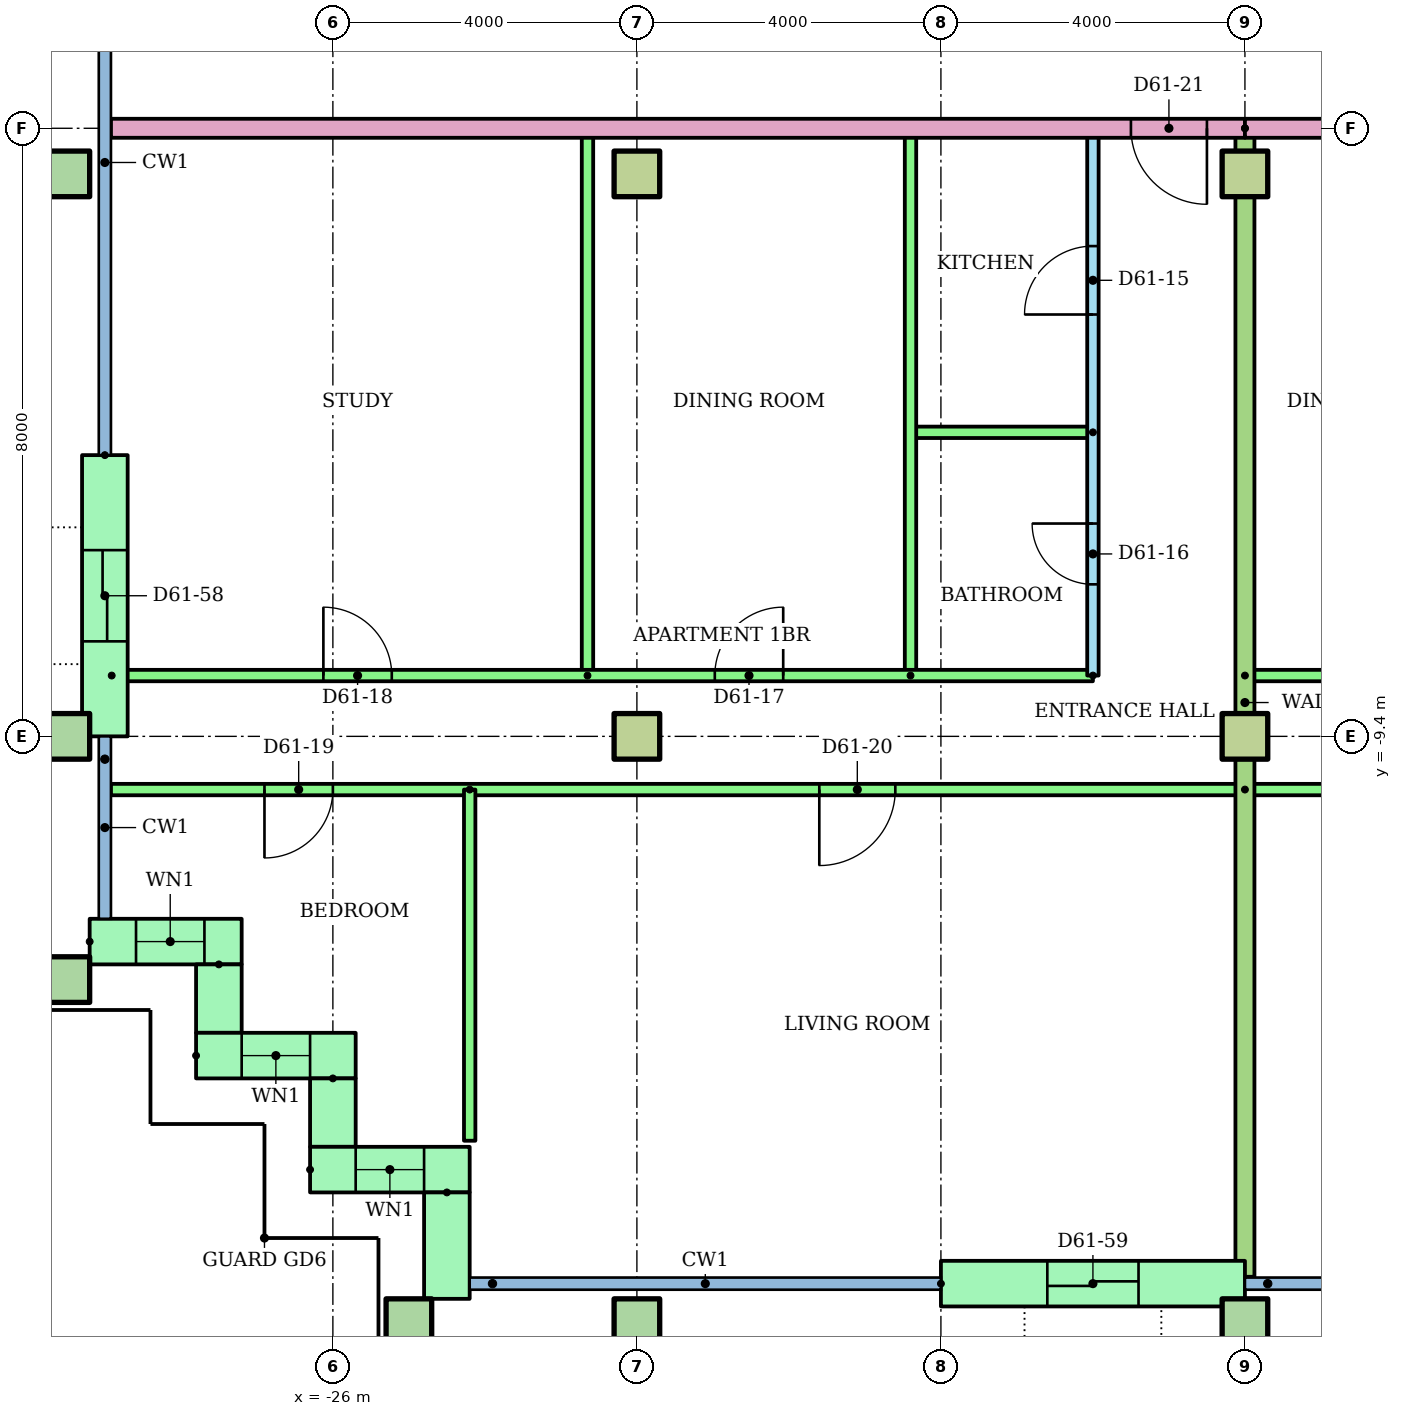
"""IFC4 building model, lengths in metres.
Left out: names, types, materials, properties, quantities, classifications, styles, units other than length and angle.
Written with IfcOpenShell. Run it as: python <this file> out.ifc"""

import sys

from ifc_helpers import new_model, si_unit, direction, frame, frame_2d, origin, origin_2d, place, context, subcontext, project, spatial, rectangle, hollow_rectangle, extrude, element, fill, save


model = new_model("IFC4")
c1 = context("Model", 3, precision=1e-05, world=origin(), true_north=direction((0.0, 1.0)))
c2 = subcontext(c1, "Body", "Model", "MODEL_VIEW")
j1 = project(units=[si_unit("LENGTHUNIT", "METRE"), si_unit("PLANEANGLEUNIT", "RADIAN")], contexts=[c1])
p1 = place(None, origin())
s1 = spatial("IfcSite", under=j1, at=p1, CompositionType="ELEMENT")
p2 = place(p1, origin())
s2 = spatial("IfcBuilding", under=s1, at=p2, CompositionType="ELEMENT")
p3 = place(p2, frame((0.0, 0.0, 233.2)))
s3 = spatial("IfcBuildingStorey", under=s2, at=p3, CompositionType="ELEMENT", Elevation=233.2)
for number, where in (
    (1, (-25.0, -17.1, 0.0)),
    (2, (-22.0, -17.1, 0.0)),
    (3, (-14.0, -17.1, 0.0)),
    (4, (-29.5, -12.6, 0.0)),
    (5, (-29.5, -9.4, 0.0)),
):
    element("IfcColumn", number, at=place(p3, frame(where)), inside=s3, PredefinedType="COLUMN", context=c2, shape_type="SweptSolid", body=[
        extrude(hollow_rectangle(XDim=0.6, YDim=0.6, WallThickness=0.03, at=origin_2d()), origin(), (0.0, 0.0, 1.0), 3.2),
    ])
for number, where in (
    (6, (-22.0, -9.4, 0.0)),
    (7, (-14.0, -9.4, 0.0)),
):
    element("IfcColumn", number, at=place(p3, frame(where)), inside=s3, PredefinedType="COLUMN", context=c2, shape_type="SweptSolid", body=[
        extrude(rectangle(XDim=0.6, YDim=0.6, at=origin_2d()), origin(), (0.0, 0.0, 1.0), 3.2),
    ])
p4 = place(p3, frame((-29.5, -2.0, 0.0)))
e8 = element("IfcColumn", 8, at=p4, inside=s3, PredefinedType="COLUMN", context=c2, shape_type="SweptSolid", body=[
    extrude(hollow_rectangle(XDim=0.6, YDim=0.6, WallThickness=0.03, at=origin_2d()), origin(), (0.0, 0.0, 1.0), 3.2),
])
for number, where in (
    (9, (-22.0, -2.0, 0.0)),
    (10, (-14.0, -2.0, 0.0)),
):
    element("IfcColumn", number, at=place(p3, frame(where)), inside=s3, PredefinedType="COLUMN", context=c2, shape_type="SweptSolid", body=[
        extrude(rectangle(XDim=0.6, YDim=0.6, at=origin_2d()), origin(), (0.0, 0.0, 1.0), 3.2),
    ])
p5 = place(p3, frame((-29.0, -5.7, 0.0), z_axis=(0.0, 0.0, 1.0), x_axis=(0.0, -1.0, 0.0)))
e11 = element("IfcWall", 11, at=p5, inside=s3, PredefinedType="STANDARD", context=c2, shape_type="SweptSolid", body=[
    extrude(rectangle(XDim=3.7, YDim=0.6, at=frame_2d((1.85, 0.0))), origin(), (0.0, 0.0, 1.0), 2.92),
])
p6 = place(p5, frame((1.25, 0.0, 0.0)))
e12 = element("IfcOpeningElement", 12, at=p6, cuts=e11, PredefinedType="OPENING", context=c2, shape_type="SweptSolid", body=[
    extrude(rectangle(XDim=1.2, YDim=2.1, at=frame_2d((0.6, 1.05))), frame((0.0, 0.31, 0.0), z_axis=(0.0, -1.0, 0.0), x_axis=(1.0, 0.0, 0.0)), (0.0, 0.0, 1.0), 0.62),
])
p7 = place(p3, frame((-29.2, -12.1, 0.0)))
e13 = element("IfcWall", 13, at=p7, inside=s3, PredefinedType="STANDARD", context=c2, shape_type="SweptSolid", body=[
    extrude(rectangle(XDim=2.0, YDim=0.6, at=frame_2d((1.0, 0.0))), origin(), (0.0, 0.0, 1.0), 2.92),
])
p8 = place(p7, frame((0.61, 0.0, 0.9)))
e14 = element("IfcOpeningElement", 14, at=p8, cuts=e13, PredefinedType="OPENING", context=c2, shape_type="SweptSolid", body=[
    extrude(rectangle(XDim=0.9, YDim=1.5, at=frame_2d((0.45, 0.75))), frame((0.0, 0.31, 0.0), z_axis=(0.0, -1.0, 0.0), x_axis=(1.0, 0.0, 0.0)), (0.0, 0.0, 1.0), 0.62),
])
p9 = place(p3, frame((-27.5, -12.4, 0.0), z_axis=(0.0, 0.0, 1.0), x_axis=(0.0, -1.0, 0.0)))
e15 = element("IfcWall", 15, at=p9, inside=s3, PredefinedType="STANDARD", context=c2, shape_type="SweptSolid", body=[
    extrude(rectangle(XDim=0.9, YDim=0.6, at=frame_2d((0.45, 0.0))), origin(), (0.0, 0.0, 1.0), 2.92),
])
p10 = place(p3, frame((-27.8, -13.6, 0.0)))
e16 = element("IfcWall", 16, at=p10, inside=s3, PredefinedType="STANDARD", context=c2, shape_type="SweptSolid", body=[
    extrude(rectangle(XDim=2.1, YDim=0.6, at=frame_2d((1.05, 0.0))), origin(), (0.0, 0.0, 1.0), 2.92),
])
p11 = place(p10, frame((0.6, 0.0, 0.9)))
e17 = element("IfcOpeningElement", 17, at=p11, cuts=e16, PredefinedType="OPENING", context=c2, shape_type="SweptSolid", body=[
    extrude(rectangle(XDim=0.9, YDim=1.5, at=frame_2d((0.45, 0.75))), frame((0.0, 0.31, 0.0), z_axis=(0.0, -1.0, 0.0), x_axis=(1.0, 0.0, 0.0)), (0.0, 0.0, 1.0), 0.62),
])
p12 = place(p3, frame((-26.0, -13.9, 0.0), z_axis=(0.0, 0.0, 1.0), x_axis=(0.0, -1.0, 0.0)))
e18 = element("IfcWall", 18, at=p12, inside=s3, PredefinedType="STANDARD", context=c2, shape_type="SweptSolid", body=[
    extrude(rectangle(XDim=0.9, YDim=0.6, at=frame_2d((0.45, 0.0))), origin(), (0.0, 0.0, 1.0), 2.92),
])
p13 = place(p3, frame((-26.3, -15.1, 0.0)))
e19 = element("IfcWall", 19, at=p13, inside=s3, PredefinedType="STANDARD", context=c2, shape_type="SweptSolid", body=[
    extrude(rectangle(XDim=2.1, YDim=0.6, at=frame_2d((1.05, 0.0))), origin(), (0.0, 0.0, 1.0), 2.92),
])
p14 = place(p13, frame((0.6, 0.0, 0.9)))
e20 = element("IfcOpeningElement", 20, at=p14, cuts=e19, PredefinedType="OPENING", context=c2, shape_type="SweptSolid", body=[
    extrude(rectangle(XDim=0.9, YDim=1.5, at=frame_2d((0.45, 0.75))), frame((0.0, 0.31, 0.0), z_axis=(0.0, -1.0, 0.0), x_axis=(1.0, 0.0, 0.0)), (0.0, 0.0, 1.0), 0.62),
])
p15 = place(p3, frame((-24.5, -15.4, 0.0), z_axis=(0.0, 0.0, 1.0), x_axis=(0.0, -1.0, 0.0)))
e21 = element("IfcWall", 21, at=p15, inside=s3, PredefinedType="STANDARD", context=c2, shape_type="SweptSolid", body=[
    extrude(rectangle(XDim=1.4, YDim=0.6, at=frame_2d((0.7, 0.0))), origin(), (0.0, 0.0, 1.0), 2.92),
])
p16 = place(p3, frame((-18.0, -16.6, 0.0)))
e22 = element("IfcWall", 22, at=p16, inside=s3, PredefinedType="STANDARD", context=c2, shape_type="SweptSolid", body=[
    extrude(rectangle(XDim=4.0, YDim=0.6, at=frame_2d((2.0, 0.0))), origin(), (0.0, 0.0, 1.0), 2.92),
])
p17 = place(p16, frame((1.4, 0.0, 0.0)))
e23 = element("IfcOpeningElement", 23, at=p17, cuts=e22, PredefinedType="OPENING", context=c2, shape_type="SweptSolid", body=[
    extrude(rectangle(XDim=1.2, YDim=2.1, at=frame_2d((0.6, 1.05))), frame((0.0, 0.31, 0.0), z_axis=(0.0, -1.0, 0.0), x_axis=(1.0, 0.0, 0.0)), (0.0, 0.0, 1.0), 0.62),
])
p18 = place(p3, frame((-16.0, -8.6, 0.0), z_axis=(0.0, 0.0, 1.0), x_axis=(0.0, 1.0, 0.0)))
e24 = element("IfcWall", 24, at=p18, inside=s3, PredefinedType="PARTITIONING", context=c2, shape_type="SweptSolid", body=[
    extrude(rectangle(XDim=7.2, YDim=0.15, at=frame_2d((3.6, 0.0))), origin(), (0.0, 0.0, 1.0), 2.4),
])
p19 = place(p18, frame((4.75, 0.0, 0.0)))
e25 = element("IfcOpeningElement", 25, at=p19, cuts=e24, PredefinedType="OPENING", context=c2, shape_type="SweptSolid", body=[
    extrude(rectangle(XDim=0.9, YDim=2.1, at=frame_2d((0.45, 1.05))), frame((0.0, 0.085, 0.0), z_axis=(0.0, -1.0, 0.0), x_axis=(1.0, 0.0, 0.0)), (0.0, 0.0, 1.0), 0.17),
])
p20 = place(p18, frame((1.2, 0.0, 0.0)))
e26 = element("IfcOpeningElement", 26, at=p20, cuts=e24, PredefinedType="OPENING", context=c2, shape_type="SweptSolid", body=[
    extrude(rectangle(XDim=0.8, YDim=2.1, at=frame_2d((0.4, 1.05))), frame((0.0, 0.085, 0.0), z_axis=(0.0, -1.0, 0.0), x_axis=(1.0, 0.0, 0.0)), (0.0, 0.0, 1.0), 0.17),
])
p21 = place(p3, frame((-16.0, -5.4, 0.0), z_axis=(0.0, 0.0, 1.0), x_axis=(-1.0, 0.0, 0.0)))
e27 = element("IfcWall", 27, at=p21, inside=s3, PredefinedType="PARTITIONING", context=c2, shape_type="SweptSolid", body=[
    extrude(rectangle(XDim=2.4, YDim=0.15, at=frame_2d((1.2, 0.0))), origin(), (0.0, 0.0, 1.0), 2.4),
])
for number, where, z_axis, x_axis in (
    (28, (-18.4, -8.6, 0.0), (0.0, 0.0, 1.0), (0.0, 1.0, 0.0)),
    (29, (-22.65, -8.6, 0.0), (0.0, 0.0, 1.0), (0.0, 1.0, 0.0)),
):
    element("IfcWall", number, at=place(p3, frame(where, z_axis=z_axis, x_axis=x_axis)), inside=s3, PredefinedType="PARTITIONING", context=c2, shape_type="SweptSolid", body=[
        extrude(rectangle(XDim=7.2, YDim=0.15, at=frame_2d((3.6, 0.0))), origin(), (0.0, 0.0, 1.0), 2.4),
    ])
p22 = place(p3, frame((-28.91, -8.6, 0.0)))
e30 = element("IfcWall", 30, at=p22, inside=s3, PredefinedType="PARTITIONING", context=c2, shape_type="SweptSolid", body=[
    extrude(rectangle(XDim=12.91, YDim=0.15, at=frame_2d((6.455, 0.0))), origin(), (0.0, 0.0, 1.0), 2.4),
])
p23 = place(p22, frame((7.935, 0.0, 0.0)))
e31 = element("IfcOpeningElement", 31, at=p23, cuts=e30, PredefinedType="OPENING", context=c2, shape_type="SweptSolid", body=[
    extrude(rectangle(XDim=0.9, YDim=2.1, at=frame_2d((0.45, 1.05))), frame((0.0, 0.085, 0.0), z_axis=(0.0, -1.0, 0.0), x_axis=(1.0, 0.0, 0.0)), (0.0, 0.0, 1.0), 0.17),
])
p24 = place(p22, frame((2.785, 0.0, 0.0)))
e32 = element("IfcOpeningElement", 32, at=p24, cuts=e30, PredefinedType="OPENING", context=c2, shape_type="SweptSolid", body=[
    extrude(rectangle(XDim=0.9, YDim=2.1, at=frame_2d((0.45, 1.05))), frame((0.0, 0.085, 0.0), z_axis=(0.0, -1.0, 0.0), x_axis=(1.0, 0.0, 0.0)), (0.0, 0.0, 1.0), 0.17),
])
p25 = place(p3, frame((-14.0, -10.1, 0.0), z_axis=(0.0, 0.0, 1.0), x_axis=(-1.0, 0.0, 0.0)))
e33 = element("IfcWall", 33, at=p25, inside=s3, PredefinedType="PARTITIONING", context=c2, shape_type="SweptSolid", body=[
    extrude(rectangle(XDim=14.92, YDim=0.15, at=frame_2d((7.46, 0.0))), origin(), (0.0, 0.0, 1.0), 2.4),
])
p26 = place(p25, frame((12.0, 0.0, 0.0)))
e34 = element("IfcOpeningElement", 34, at=p26, cuts=e33, PredefinedType="OPENING", context=c2, shape_type="SweptSolid", body=[
    extrude(rectangle(XDim=0.9, YDim=2.1, at=frame_2d((0.45, 1.05))), frame((0.0, 0.085, 0.0), z_axis=(0.0, -1.0, 0.0), x_axis=(1.0, 0.0, 0.0)), (0.0, 0.0, 1.0), 0.17),
])
p27 = place(p25, frame((4.6, 0.0, 0.0)))
e35 = element("IfcOpeningElement", 35, at=p27, cuts=e33, PredefinedType="OPENING", context=c2, shape_type="SweptSolid", body=[
    extrude(rectangle(XDim=1.0, YDim=2.1, at=frame_2d((0.5, 1.05))), frame((0.0, 0.085, 0.0), z_axis=(0.0, -1.0, 0.0), x_axis=(1.0, 0.0, 0.0)), (0.0, 0.0, 1.0), 0.17),
])
p28 = place(p3, frame((-24.2, -10.1, 0.0), z_axis=(0.0, 0.0, 1.0), x_axis=(0.0, -1.0, 0.0)))
e36 = element("IfcWall", 36, at=p28, inside=s3, PredefinedType="PARTITIONING", context=c2, shape_type="SweptSolid", body=[
    extrude(rectangle(XDim=4.62, YDim=0.15, at=frame_2d((2.31, 0.0))), origin(), (0.0, 0.0, 1.0), 2.4),
])
p29 = place(p3, frame((-14.0, -8.6, 0.0)))
e37 = element("IfcWall", 37, at=p29, inside=s3, PredefinedType="PARTITIONING", context=c2, shape_type="SweptSolid", body=[
    extrude(rectangle(XDim=14.0, YDim=0.15, at=frame_2d((7.0, 0.0))), origin(), (0.0, 0.0, 1.0), 2.4),
])
p30 = place(p29, frame((8.775, 0.0, 0.0)))
e38 = element("IfcOpeningElement", 38, at=p30, cuts=e37, PredefinedType="OPENING", context=c2, shape_type="SweptSolid", body=[
    extrude(rectangle(XDim=0.9, YDim=2.1, at=frame_2d((0.45, 1.05))), frame((0.0, 0.085, 0.0), z_axis=(0.0, -1.0, 0.0), x_axis=(1.0, 0.0, 0.0)), (0.0, 0.0, 1.0), 0.17),
])
p31 = place(p29, frame((4.525, 0.0, 0.0)))
e39 = element("IfcOpeningElement", 39, at=p31, cuts=e37, PredefinedType="OPENING", context=c2, shape_type="SweptSolid", body=[
    extrude(rectangle(XDim=0.9, YDim=2.1, at=frame_2d((0.45, 1.05))), frame((0.0, 0.085, 0.0), z_axis=(0.0, -1.0, 0.0), x_axis=(1.0, 0.0, 0.0)), (0.0, 0.0, 1.0), 0.17),
])
p32 = place(p29, frame((1.1, 0.0, 0.0)))
e40 = element("IfcOpeningElement", 40, at=p32, cuts=e37, PredefinedType="OPENING", context=c2, shape_type="SweptSolid", body=[
    extrude(rectangle(XDim=0.9, YDim=2.1, at=frame_2d((0.45, 1.05))), frame((0.0, 0.085, 0.0), z_axis=(0.0, -1.0, 0.0), x_axis=(1.0, 0.0, 0.0)), (0.0, 0.0, 1.0), 0.17),
])
p33 = place(p3, frame((2.0, -10.1, 0.0), z_axis=(0.0, 0.0, 1.0), x_axis=(-1.0, 0.0, 0.0)))
e41 = element("IfcWall", 41, at=p33, inside=s3, PredefinedType="PARTITIONING", context=c2, shape_type="SweptSolid", body=[
    extrude(rectangle(XDim=16.0, YDim=0.15, at=frame_2d((8.0, 0.0))), origin(), (0.0, 0.0, 1.0), 2.4),
])
p34 = place(p33, frame((13.55, 0.0, 0.0)))
e42 = element("IfcOpeningElement", 42, at=p34, cuts=e41, PredefinedType="OPENING", context=c2, shape_type="SweptSolid", body=[
    extrude(rectangle(XDim=0.9, YDim=2.1, at=frame_2d((0.45, 1.05))), frame((0.0, 0.085, 0.0), z_axis=(0.0, -1.0, 0.0), x_axis=(1.0, 0.0, 0.0)), (0.0, 0.0, 1.0), 0.17),
])
p35 = place(p33, frame((9.5, 0.0, 0.0)))
e43 = element("IfcOpeningElement", 43, at=p35, cuts=e41, PredefinedType="OPENING", context=c2, shape_type="SweptSolid", body=[
    extrude(rectangle(XDim=1.0, YDim=2.1, at=frame_2d((0.5, 1.05))), frame((0.0, 0.085, 0.0), z_axis=(0.0, -1.0, 0.0), x_axis=(1.0, 0.0, 0.0)), (0.0, 0.0, 1.0), 0.17),
])
p36 = place(p33, frame((5.55, 0.0, 0.0)))
e44 = element("IfcOpeningElement", 44, at=p36, cuts=e41, PredefinedType="OPENING", context=c2, shape_type="SweptSolid", body=[
    extrude(rectangle(XDim=0.9, YDim=2.1, at=frame_2d((0.45, 1.05))), frame((0.0, 0.085, 0.0), z_axis=(0.0, -1.0, 0.0), x_axis=(1.0, 0.0, 0.0)), (0.0, 0.0, 1.0), 0.17),
])
p37 = place(p33, frame((1.55, 0.0, 0.0)))
e45 = element("IfcOpeningElement", 45, at=p37, cuts=e41, PredefinedType="OPENING", context=c2, shape_type="SweptSolid", body=[
    extrude(rectangle(XDim=0.9, YDim=2.1, at=frame_2d((0.45, 1.05))), frame((0.0, 0.085, 0.0), z_axis=(0.0, -1.0, 0.0), x_axis=(1.0, 0.0, 0.0)), (0.0, 0.0, 1.0), 0.17),
])
p38 = place(p3, frame((-14.0, -1.4, 0.0), z_axis=(0.0, 0.0, 1.0), x_axis=(0.0, -1.0, 0.0)))
e46 = element("IfcWall", 46, at=p38, inside=s3, PredefinedType="PARTITIONING", context=c2, shape_type="SweptSolid", body=[
    extrude(rectangle(XDim=15.11, YDim=0.25, at=frame_2d((7.555, 0.0))), origin(), (0.0, 0.0, 1.0), 2.4),
])
p39 = place(p3, frame((-14.0, -1.4, 0.0), z_axis=(0.0, 0.0, 1.0), x_axis=(-1.0, 0.0, 0.0)))
e47 = element("IfcWall", 47, at=p39, inside=s3, PredefinedType="PARTITIONING", context=c2, shape_type="SweptSolid", body=[
    extrude(rectangle(XDim=14.92, YDim=0.25, at=frame_2d((7.46, 0.0))), origin(), (0.0, 0.0, 1.0), 2.4),
])
p40 = place(p39, frame((0.5, 0.0, 0.0)))
e48 = element("IfcOpeningElement", 48, at=p40, cuts=e47, PredefinedType="OPENING", context=c2, shape_type="SweptSolid", body=[
    extrude(rectangle(XDim=1.0, YDim=2.1, at=frame_2d((0.5, 1.05))), frame((0.0, 0.135, 0.0), z_axis=(0.0, -1.0, 0.0), x_axis=(1.0, 0.0, 0.0)), (0.0, 0.0, 1.0), 0.27),
])
p41 = place(p3, frame((14.0, -1.4, 0.0), z_axis=(0.0, 0.0, 1.0), x_axis=(-1.0, 0.0, 0.0)))
e49 = element("IfcWall", 49, at=p41, inside=s3, PredefinedType="PARTITIONING", context=c2, shape_type="SweptSolid", body=[
    extrude(rectangle(XDim=28.0, YDim=0.25, at=frame_2d((14.0, 0.0))), origin(), (0.0, 0.0, 1.0), 2.4),
])
p42 = place(p41, frame((12.5, 0.0, 0.0)))
e50 = element("IfcOpeningElement", 50, at=p42, cuts=e49, PredefinedType="OPENING", context=c2, shape_type="SweptSolid", body=[
    extrude(rectangle(XDim=1.0, YDim=2.1, at=frame_2d((0.5, 1.05))), frame((0.0, 0.135, 0.0), z_axis=(0.0, -1.0, 0.0), x_axis=(1.0, 0.0, 0.0)), (0.0, 0.0, 1.0), 0.27),
])
p43 = place(p41, frame((10.5, 0.0, 0.0)))
e51 = element("IfcOpeningElement", 51, at=p43, cuts=e49, PredefinedType="OPENING", context=c2, shape_type="SweptSolid", body=[
    extrude(rectangle(XDim=1.0, YDim=2.1, at=frame_2d((0.5, 1.05))), frame((0.0, 0.135, 0.0), z_axis=(0.0, -1.0, 0.0), x_axis=(1.0, 0.0, 0.0)), (0.0, 0.0, 1.0), 0.27),
])
p44 = place(p8, origin())
e52 = element("IfcWindow", 52, at=p44, inside=s3, PartitioningType="SINGLE_PANEL", PredefinedType="WINDOW", context=c2, shape_type="SweptSolid", body=[
    extrude(rectangle(XDim=0.9, YDim=1.5, at=frame_2d((0.45, 0.75))), frame((0.0, 0.03, 0.0), z_axis=(0.0, -1.0, 0.0), x_axis=(1.0, 0.0, 0.0)), (0.0, 0.0, 1.0), 0.06),
])
fill(e14, e52)
p45 = place(p11, origin())
e53 = element("IfcWindow", 53, at=p45, inside=s3, PartitioningType="SINGLE_PANEL", PredefinedType="WINDOW", context=c2, shape_type="SweptSolid", body=[
    extrude(rectangle(XDim=0.9, YDim=1.5, at=frame_2d((0.45, 0.75))), frame((0.0, 0.03, 0.0), z_axis=(0.0, -1.0, 0.0), x_axis=(1.0, 0.0, 0.0)), (0.0, 0.0, 1.0), 0.06),
])
fill(e17, e53)
p46 = place(p14, origin())
e54 = element("IfcWindow", 54, at=p46, inside=s3, PartitioningType="SINGLE_PANEL", PredefinedType="WINDOW", context=c2, shape_type="SweptSolid", body=[
    extrude(rectangle(XDim=0.9, YDim=1.5, at=frame_2d((0.45, 0.75))), frame((0.0, 0.03, 0.0), z_axis=(0.0, -1.0, 0.0), x_axis=(1.0, 0.0, 0.0)), (0.0, 0.0, 1.0), 0.06),
])
fill(e20, e54)
p47 = place(p19, origin())
e55 = element("IfcDoor", 55, at=p47, inside=s3, OperationType="SINGLE_SWING_LEFT", PredefinedType="DOOR", context=c2, shape_type="SweptSolid", body=[
    extrude(rectangle(XDim=0.9, YDim=2.1, at=frame_2d((0.45, 1.05))), frame((0.0, 0.025, 0.0), z_axis=(0.0, -1.0, 0.0), x_axis=(1.0, 0.0, 0.0)), (0.0, 0.0, 1.0), 0.05),
])
fill(e25, e55)
p48 = place(p20, origin())
e56 = element("IfcDoor", 56, at=p48, inside=s3, OperationType="SINGLE_SWING_RIGHT", PredefinedType="DOOR", context=c2, shape_type="SweptSolid", body=[
    extrude(rectangle(XDim=0.8, YDim=2.1, at=frame_2d((0.4, 1.05))), frame((0.0, 0.025, 0.0), z_axis=(0.0, -1.0, 0.0), x_axis=(1.0, 0.0, 0.0)), (0.0, 0.0, 1.0), 0.05),
])
fill(e26, e56)
p49 = place(p23, origin())
e57 = element("IfcDoor", 57, at=p49, inside=s3, OperationType="SINGLE_SWING_RIGHT", PredefinedType="DOOR", context=c2, shape_type="SweptSolid", body=[
    extrude(rectangle(XDim=0.9, YDim=2.1, at=frame_2d((0.45, 1.05))), frame((0.0, 0.025, 0.0), z_axis=(0.0, -1.0, 0.0), x_axis=(1.0, 0.0, 0.0)), (0.0, 0.0, 1.0), 0.05),
])
fill(e31, e57)
p50 = place(p24, origin())
e58 = element("IfcDoor", 58, at=p50, inside=s3, OperationType="SINGLE_SWING_LEFT", PredefinedType="DOOR", context=c2, shape_type="SweptSolid", body=[
    extrude(rectangle(XDim=0.9, YDim=2.1, at=frame_2d((0.45, 1.05))), frame((0.0, 0.025, 0.0), z_axis=(0.0, -1.0, 0.0), x_axis=(1.0, 0.0, 0.0)), (0.0, 0.0, 1.0), 0.05),
])
fill(e32, e58)
p51 = place(p26, origin())
e59 = element("IfcDoor", 59, at=p51, inside=s3, OperationType="SINGLE_SWING_RIGHT", PredefinedType="DOOR", context=c2, shape_type="SweptSolid", body=[
    extrude(rectangle(XDim=0.9, YDim=2.1, at=frame_2d((0.45, 1.05))), frame((0.0, 0.025, 0.0), z_axis=(0.0, -1.0, 0.0), x_axis=(1.0, 0.0, 0.0)), (0.0, 0.0, 1.0), 0.05),
])
fill(e34, e59)
p52 = place(p27, origin())
e60 = element("IfcDoor", 60, at=p52, inside=s3, OperationType="SINGLE_SWING_RIGHT", PredefinedType="DOOR", context=c2, shape_type="SweptSolid", body=[
    extrude(rectangle(XDim=1.0, YDim=2.1, at=frame_2d((0.5, 1.05))), frame((0.0, 0.025, 0.0), z_axis=(0.0, -1.0, 0.0), x_axis=(1.0, 0.0, 0.0)), (0.0, 0.0, 1.0), 0.05),
])
fill(e35, e60)
p53 = place(p40, origin())
e61 = element("IfcDoor", 61, at=p53, inside=s3, OperationType="SINGLE_SWING_LEFT", PredefinedType="DOOR", context=c2, shape_type="SweptSolid", body=[
    extrude(rectangle(XDim=1.0, YDim=2.1, at=frame_2d((0.5, 1.05))), frame((0.0, 0.025, 0.0), z_axis=(0.0, -1.0, 0.0), x_axis=(1.0, 0.0, 0.0)), (0.0, 0.0, 1.0), 0.05),
])
fill(e48, e61)
p54 = place(p6, origin())
e62 = element("IfcDoor", 62, at=p54, inside=s3, OperationType="SLIDING_TO_LEFT", PredefinedType="DOOR", context=c2, shape_type="SweptSolid", body=[
    extrude(rectangle(XDim=1.2, YDim=2.1, at=frame_2d((0.6, 1.05))), frame((0.0, 0.025, 0.0), z_axis=(0.0, -1.0, 0.0), x_axis=(1.0, 0.0, 0.0)), (0.0, 0.0, 1.0), 0.05),
])
fill(e12, e62)
p55 = place(p17, origin())
e63 = element("IfcDoor", 63, at=p55, inside=s3, OperationType="SLIDING_TO_LEFT", PredefinedType="DOOR", context=c2, shape_type="SweptSolid", body=[
    extrude(rectangle(XDim=1.2, YDim=2.1, at=frame_2d((0.6, 1.05))), frame((0.0, 0.025, 0.0), z_axis=(0.0, -1.0, 0.0), x_axis=(1.0, 0.0, 0.0)), (0.0, 0.0, 1.0), 0.05),
])
fill(e23, e63)
save(model, sys.argv[1])
